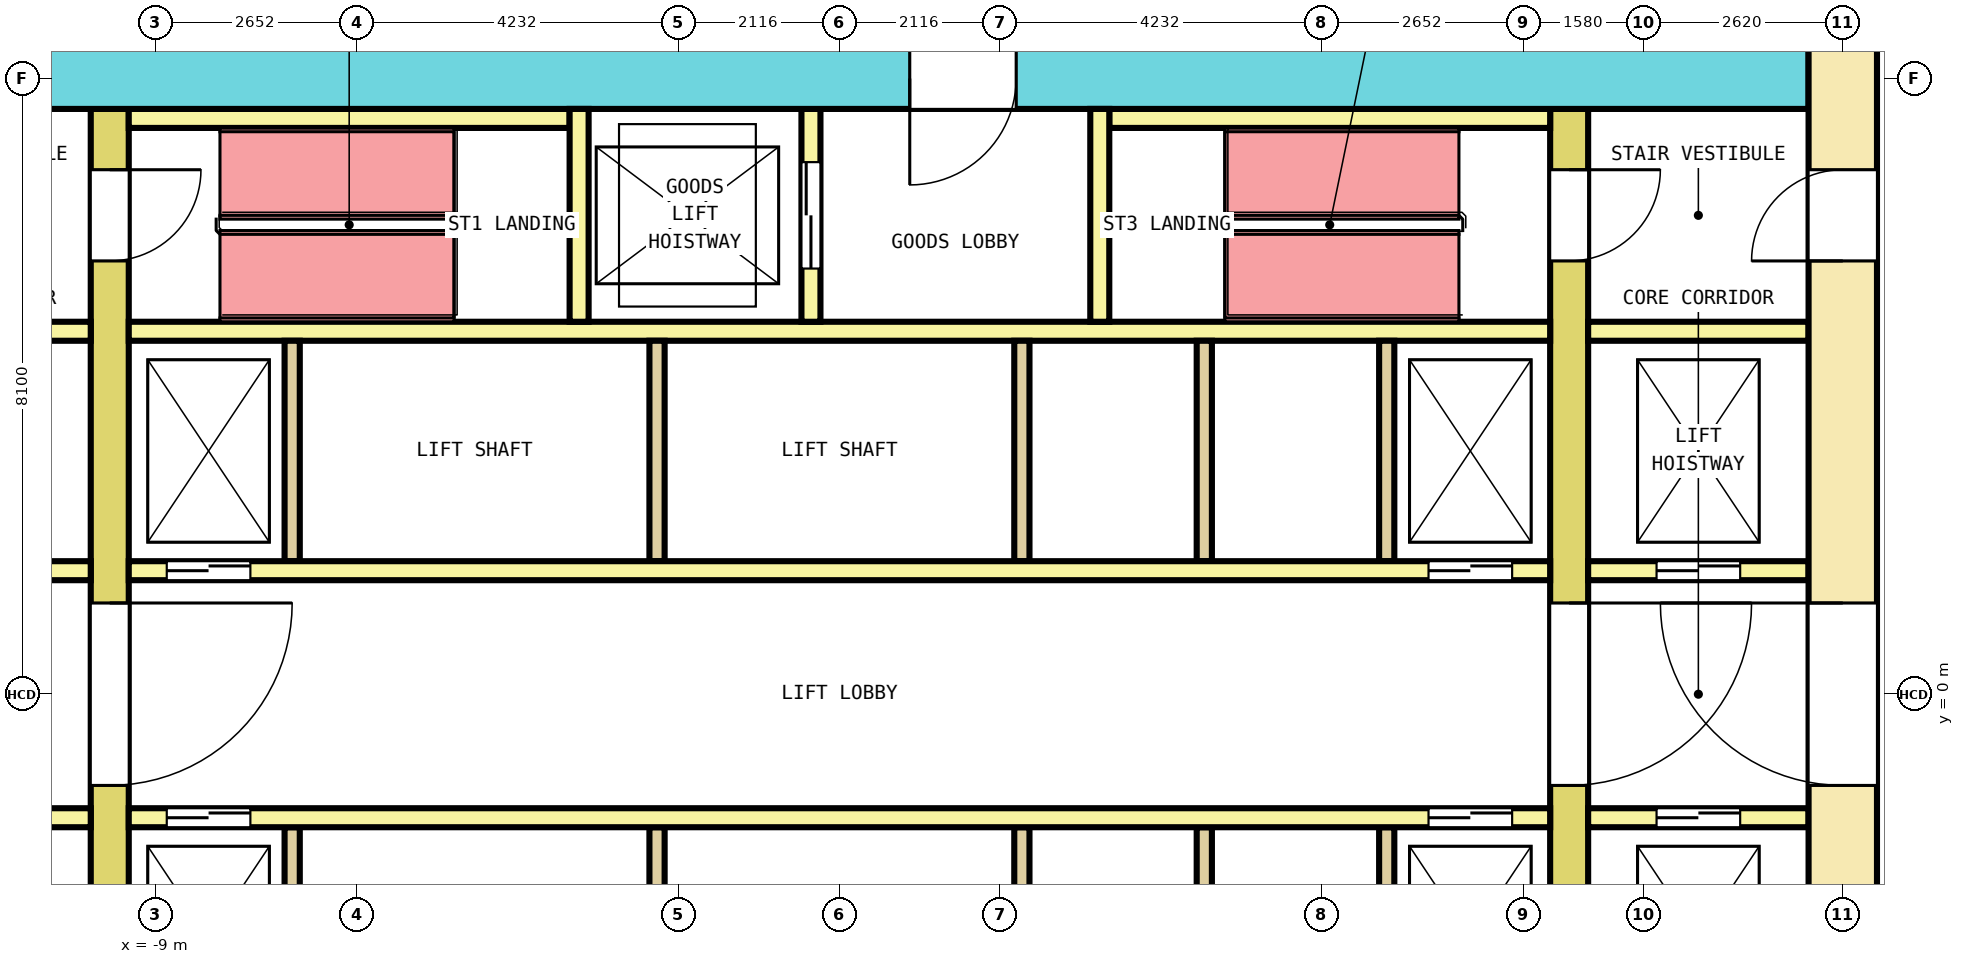
"""IFC4 building model, lengths in metres.
Left out: names, types, materials, properties, quantities, classifications, styles, units other than length and angle.
Written with IfcOpenShell. Run it as: python <this file> out.ifc"""

import sys

from ifc_helpers import new_model, si_unit, direction, frame, frame_2d, origin, place, context, subcontext, project, spatial, rectangle, extrude, element, fill, save


model = new_model("IFC4")
c1 = context("Model", 3, precision=1e-05, world=origin(), true_north=direction((0.0, 1.0)))
c2 = subcontext(c1, "Body", "Model", "MODEL_VIEW")
j1 = project(units=[si_unit("LENGTHUNIT", "METRE"), si_unit("PLANEANGLEUNIT", "RADIAN")], contexts=[c1])
p1 = place(None, origin())
s1 = spatial("IfcSite", under=j1, at=p1, CompositionType="ELEMENT")
p2 = place(p1, origin())
s2 = spatial("IfcBuilding", under=s1, at=p2, CompositionType="ELEMENT")
p3 = place(p2, frame((0.0, 0.0, 45.4)))
s3 = spatial("IfcBuildingStorey", under=s2, at=p3, CompositionType="ELEMENT", Elevation=45.4)
p4 = place(p3, frame((13.2, -10.35, 0.0), z_axis=(0.0, 0.0, 1.0), x_axis=(0.0, 1.0, 0.0)))
e1 = element("IfcWall", 1, at=p4, inside=s3, PredefinedType="SHEAR", context=c2, shape_type="SweptSolid", body=[
    extrude(rectangle(XDim=20.7, YDim=0.9, at=frame_2d((10.35, 0.0))), origin(), (0.0, 0.0, 1.0), 4.1),
])
p5 = place(p4, frame((9.15, 0.0, 0.0)))
e2 = element("IfcOpeningElement", 2, at=p5, cuts=e1, PredefinedType="OPENING", context=c2, shape_type="SweptSolid", body=[
    extrude(rectangle(XDim=2.4, YDim=2.1, at=frame_2d((1.2, 1.05))), frame((0.0, 0.46, 0.0), z_axis=(0.0, -1.0, 0.0), x_axis=(1.0, 0.0, 0.0)), (0.0, 0.0, 1.0), 0.92),
])
p6 = place(p4, frame((16.05, 0.0, 0.0)))
e3 = element("IfcOpeningElement", 3, at=p6, cuts=e1, PredefinedType="OPENING", context=c2, shape_type="SweptSolid", body=[
    extrude(rectangle(XDim=1.2, YDim=2.1, at=frame_2d((0.6, 1.05))), frame((0.0, 0.46, 0.0), z_axis=(0.0, -1.0, 0.0), x_axis=(1.0, 0.0, 0.0)), (0.0, 0.0, 1.0), 0.92),
])
p7 = place(p4, frame((3.55, 0.0, 0.0)))
e4 = element("IfcOpeningElement", 4, at=p7, cuts=e1, PredefinedType="OPENING", context=c2, shape_type="SweptSolid", body=[
    extrude(rectangle(XDim=1.0, YDim=2.1, at=frame_2d((0.5, 1.05))), frame((0.0, 0.46, 0.0), z_axis=(0.0, -1.0, 0.0), x_axis=(1.0, 0.0, 0.0)), (0.0, 0.0, 1.0), 0.92),
])
p8 = place(p3, frame((-12.75, 8.1, 0.0), z_axis=(0.0, 0.0, 1.0), x_axis=(1.0, 0.0, 0.0)))
e5 = element("IfcWall", 5, at=p8, inside=s3, PredefinedType="SHEAR", context=c2, shape_type="SweptSolid", body=[
    extrude(rectangle(XDim=25.5, YDim=0.8, at=frame_2d((12.75, 0.0))), origin(), (0.0, 0.0, 1.0), 4.1),
])
p9 = place(p8, frame((13.675, 0.0, 0.0)))
e6 = element("IfcOpeningElement", 6, at=p9, cuts=e5, PredefinedType="OPENING", context=c2, shape_type="SweptSolid", body=[
    extrude(rectangle(XDim=1.4, YDim=2.1, at=frame_2d((0.7, 1.05))), frame((0.0, 0.41, 0.0), z_axis=(0.0, -1.0, 0.0), x_axis=(1.0, 0.0, 0.0)), (0.0, 0.0, 1.0), 0.82),
])
p10 = place(p3, frame((-9.6, -7.7, 0.0), z_axis=(0.0, 0.0, 1.0), x_axis=(0.0, 1.0, 0.0)))
e7 = element("IfcWall", 7, at=p10, inside=s3, PredefinedType="SHEAR", context=c2, shape_type="SweptSolid", body=[
    extrude(rectangle(XDim=15.4, YDim=0.5, at=frame_2d((7.7, 0.0))), origin(), (0.0, 0.0, 1.0), 4.1),
])
p11 = place(p10, frame((6.5, 0.0, 0.0)))
e8 = element("IfcOpeningElement", 8, at=p11, cuts=e7, PredefinedType="OPENING", context=c2, shape_type="SweptSolid", body=[
    extrude(rectangle(XDim=2.4, YDim=2.1, at=frame_2d((1.2, 1.05))), frame((0.0, 0.26, 0.0), z_axis=(0.0, -1.0, 0.0), x_axis=(1.0, 0.0, 0.0)), (0.0, 0.0, 1.0), 0.52),
])
p12 = place(p10, frame((13.4, 0.0, 0.0)))
e9 = element("IfcOpeningElement", 9, at=p12, cuts=e7, PredefinedType="OPENING", context=c2, shape_type="SweptSolid", body=[
    extrude(rectangle(XDim=1.2, YDim=2.1, at=frame_2d((0.6, 1.05))), frame((0.0, 0.26, 0.0), z_axis=(0.0, -1.0, 0.0), x_axis=(1.0, 0.0, 0.0)), (0.0, 0.0, 1.0), 0.52),
])
p13 = place(p10, frame((0.8, 0.0, 0.0)))
e10 = element("IfcOpeningElement", 10, at=p13, cuts=e7, PredefinedType="OPENING", context=c2, shape_type="SweptSolid", body=[
    extrude(rectangle(XDim=1.2, YDim=2.1, at=frame_2d((0.6, 1.05))), frame((0.0, 0.26, 0.0), z_axis=(0.0, -1.0, 0.0), x_axis=(1.0, 0.0, 0.0)), (0.0, 0.0, 1.0), 0.52),
])
p14 = place(p3, frame((9.6, -7.7, 0.0), z_axis=(0.0, 0.0, 1.0), x_axis=(0.0, 1.0, 0.0)))
e11 = element("IfcWall", 11, at=p14, inside=s3, PredefinedType="SHEAR", context=c2, shape_type="SweptSolid", body=[
    extrude(rectangle(XDim=15.4, YDim=0.5, at=frame_2d((7.7, 0.0))), origin(), (0.0, 0.0, 1.0), 4.1),
])
p15 = place(p14, frame((6.5, 0.0, 0.0)))
e12 = element("IfcOpeningElement", 12, at=p15, cuts=e11, PredefinedType="OPENING", context=c2, shape_type="SweptSolid", body=[
    extrude(rectangle(XDim=2.4, YDim=2.1, at=frame_2d((1.2, 1.05))), frame((0.0, 0.26, 0.0), z_axis=(0.0, -1.0, 0.0), x_axis=(1.0, 0.0, 0.0)), (0.0, 0.0, 1.0), 0.52),
])
p16 = place(p14, frame((13.4, 0.0, 0.0)))
e13 = element("IfcOpeningElement", 13, at=p16, cuts=e11, PredefinedType="OPENING", context=c2, shape_type="SweptSolid", body=[
    extrude(rectangle(XDim=1.2, YDim=2.1, at=frame_2d((0.6, 1.05))), frame((0.0, 0.26, 0.0), z_axis=(0.0, -1.0, 0.0), x_axis=(1.0, 0.0, 0.0)), (0.0, 0.0, 1.0), 0.52),
])
p17 = place(p14, frame((0.9, 0.0, 0.0)))
e14 = element("IfcOpeningElement", 14, at=p17, cuts=e11, PredefinedType="OPENING", context=c2, shape_type="SweptSolid", body=[
    extrude(rectangle(XDim=1.0, YDim=2.1, at=frame_2d((0.5, 1.05))), frame((0.0, 0.26, 0.0), z_axis=(0.0, -1.0, 0.0), x_axis=(1.0, 0.0, 0.0)), (0.0, 0.0, 1.0), 0.52),
])
p18 = place(p3, frame((-12.75, 1.625, 0.0), z_axis=(0.0, 0.0, 1.0), x_axis=(1.0, 0.0, 0.0)))
e15 = element("IfcWall", 15, at=p18, inside=s3, PredefinedType="SOLIDWALL", context=c2, shape_type="SweptSolid", body=[
    extrude(rectangle(XDim=2.9, YDim=0.25, at=frame_2d((1.45, 0.0))), origin(), (0.0, 0.0, 1.0), 4.1),
])
p19 = place(p18, frame((0.9, 0.0, 0.0)))
e16 = element("IfcOpeningElement", 16, at=p19, cuts=e15, PredefinedType="OPENING", context=c2, shape_type="SweptSolid", body=[
    extrude(rectangle(XDim=1.1, YDim=2.1, at=frame_2d((0.55, 1.05))), frame((0.0, 0.135, 0.0), z_axis=(0.0, -1.0, 0.0), x_axis=(1.0, 0.0, 0.0)), (0.0, 0.0, 1.0), 0.27),
])
p20 = place(p3, frame((-9.35, 1.625, 0.0), z_axis=(0.0, 0.0, 1.0), x_axis=(1.0, 0.0, 0.0)))
e17 = element("IfcWall", 17, at=p20, inside=s3, PredefinedType="SOLIDWALL", context=c2, shape_type="SweptSolid", body=[
    extrude(rectangle(XDim=18.7, YDim=0.25, at=frame_2d((9.35, 0.0))), origin(), (0.0, 0.0, 1.0), 4.1),
])
p21 = place(p20, frame((0.5, 0.0, 0.0)))
e18 = element("IfcOpeningElement", 18, at=p21, cuts=e17, PredefinedType="OPENING", context=c2, shape_type="SweptSolid", body=[
    extrude(rectangle(XDim=1.1, YDim=2.1, at=frame_2d((0.55, 1.05))), frame((0.0, 0.135, 0.0), z_axis=(0.0, -1.0, 0.0), x_axis=(1.0, 0.0, 0.0)), (0.0, 0.0, 1.0), 0.27),
])
p22 = place(p20, frame((17.1, 0.0, 0.0)))
e19 = element("IfcOpeningElement", 19, at=p22, cuts=e17, PredefinedType="OPENING", context=c2, shape_type="SweptSolid", body=[
    extrude(rectangle(XDim=1.1, YDim=2.1, at=frame_2d((0.55, 1.05))), frame((0.0, 0.135, 0.0), z_axis=(0.0, -1.0, 0.0), x_axis=(1.0, 0.0, 0.0)), (0.0, 0.0, 1.0), 0.27),
])
p23 = place(p3, frame((9.85, 1.625, 0.0), z_axis=(0.0, 0.0, 1.0), x_axis=(1.0, 0.0, 0.0)))
e20 = element("IfcWall", 20, at=p23, inside=s3, PredefinedType="SOLIDWALL", context=c2, shape_type="SweptSolid", body=[
    extrude(rectangle(XDim=2.9, YDim=0.25, at=frame_2d((1.45, 0.0))), origin(), (0.0, 0.0, 1.0), 4.1),
])
p24 = place(p23, frame((0.9, 0.0, 0.0)))
e21 = element("IfcOpeningElement", 21, at=p24, cuts=e20, PredefinedType="OPENING", context=c2, shape_type="SweptSolid", body=[
    extrude(rectangle(XDim=1.1, YDim=2.1, at=frame_2d((0.55, 1.05))), frame((0.0, 0.135, 0.0), z_axis=(0.0, -1.0, 0.0), x_axis=(1.0, 0.0, 0.0)), (0.0, 0.0, 1.0), 0.27),
])
p25 = place(p3, frame((-12.75, 4.775, 0.0), z_axis=(0.0, 0.0, 1.0), x_axis=(1.0, 0.0, 0.0)))
e22 = element("IfcWall", 22, at=p25, inside=s3, PredefinedType="SOLIDWALL", context=c2, shape_type="SweptSolid", body=[
    extrude(rectangle(XDim=2.9, YDim=0.25, at=frame_2d((1.45, 0.0))), origin(), (0.0, 0.0, 1.0), 4.1),
])
p26 = place(p3, frame((-9.35, 4.775, 0.0), z_axis=(0.0, 0.0, 1.0), x_axis=(1.0, 0.0, 0.0)))
e23 = element("IfcWall", 23, at=p26, inside=s3, PredefinedType="SOLIDWALL", context=c2, shape_type="SweptSolid", body=[
    extrude(rectangle(XDim=18.7, YDim=0.25, at=frame_2d((9.35, 0.0))), origin(), (0.0, 0.0, 1.0), 4.1),
])
p27 = place(p3, frame((9.85, 4.775, 0.0), z_axis=(0.0, 0.0, 1.0), x_axis=(1.0, 0.0, 0.0)))
e24 = element("IfcWall", 24, at=p27, inside=s3, PredefinedType="SOLIDWALL", context=c2, shape_type="SweptSolid", body=[
    extrude(rectangle(XDim=2.9, YDim=0.25, at=frame_2d((1.45, 0.0))), origin(), (0.0, 0.0, 1.0), 4.1),
])
for number, where, z_axis, x_axis in (
    (25, (-7.2, 1.75, 0.0), (0.0, 0.0, 1.0), (0.0, 1.0, 0.0)),
    (26, (-2.4, 1.75, 0.0), (0.0, 0.0, 1.0), (0.0, 1.0, 0.0)),
    (27, (2.4, 1.75, 0.0), (0.0, 0.0, 1.0), (0.0, 1.0, 0.0)),
    (28, (4.8, 1.75, 0.0), (0.0, 0.0, 1.0), (0.0, 1.0, 0.0)),
    (29, (7.2, 1.75, 0.0), (0.0, 0.0, 1.0), (0.0, 1.0, 0.0)),
):
    element("IfcWall", number, at=place(p3, frame(where, z_axis=z_axis, x_axis=x_axis)), inside=s3, PredefinedType="SOLIDWALL", context=c2, shape_type="SweptSolid", body=[
        extrude(rectangle(XDim=2.9, YDim=0.2, at=frame_2d((1.45, 0.0))), origin(), (0.0, 0.0, 1.0), 4.1),
    ])
p28 = place(p3, frame((-12.75, -1.625, 0.0), z_axis=(0.0, 0.0, 1.0), x_axis=(1.0, 0.0, 0.0)))
e30 = element("IfcWall", 30, at=p28, inside=s3, PredefinedType="SOLIDWALL", context=c2, shape_type="SweptSolid", body=[
    extrude(rectangle(XDim=2.9, YDim=0.25, at=frame_2d((1.45, 0.0))), origin(), (0.0, 0.0, 1.0), 4.1),
])
p29 = place(p28, frame((0.9, 0.0, 0.0)))
e31 = element("IfcOpeningElement", 31, at=p29, cuts=e30, PredefinedType="OPENING", context=c2, shape_type="SweptSolid", body=[
    extrude(rectangle(XDim=1.1, YDim=2.1, at=frame_2d((0.55, 1.05))), frame((0.0, 0.135, 0.0), z_axis=(0.0, -1.0, 0.0), x_axis=(1.0, 0.0, 0.0)), (0.0, 0.0, 1.0), 0.27),
])
p30 = place(p3, frame((-9.35, -1.625, 0.0), z_axis=(0.0, 0.0, 1.0), x_axis=(1.0, 0.0, 0.0)))
e32 = element("IfcWall", 32, at=p30, inside=s3, PredefinedType="SOLIDWALL", context=c2, shape_type="SweptSolid", body=[
    extrude(rectangle(XDim=18.7, YDim=0.25, at=frame_2d((9.35, 0.0))), origin(), (0.0, 0.0, 1.0), 4.1),
])
p31 = place(p30, frame((0.5, 0.0, 0.0)))
e33 = element("IfcOpeningElement", 33, at=p31, cuts=e32, PredefinedType="OPENING", context=c2, shape_type="SweptSolid", body=[
    extrude(rectangle(XDim=1.1, YDim=2.1, at=frame_2d((0.55, 1.05))), frame((0.0, 0.135, 0.0), z_axis=(0.0, -1.0, 0.0), x_axis=(1.0, 0.0, 0.0)), (0.0, 0.0, 1.0), 0.27),
])
p32 = place(p30, frame((17.1, 0.0, 0.0)))
e34 = element("IfcOpeningElement", 34, at=p32, cuts=e32, PredefinedType="OPENING", context=c2, shape_type="SweptSolid", body=[
    extrude(rectangle(XDim=1.1, YDim=2.1, at=frame_2d((0.55, 1.05))), frame((0.0, 0.135, 0.0), z_axis=(0.0, -1.0, 0.0), x_axis=(1.0, 0.0, 0.0)), (0.0, 0.0, 1.0), 0.27),
])
p33 = place(p3, frame((9.85, -1.625, 0.0), z_axis=(0.0, 0.0, 1.0), x_axis=(1.0, 0.0, 0.0)))
e35 = element("IfcWall", 35, at=p33, inside=s3, PredefinedType="SOLIDWALL", context=c2, shape_type="SweptSolid", body=[
    extrude(rectangle(XDim=2.9, YDim=0.25, at=frame_2d((1.45, 0.0))), origin(), (0.0, 0.0, 1.0), 4.1),
])
p34 = place(p33, frame((0.9, 0.0, 0.0)))
e36 = element("IfcOpeningElement", 36, at=p34, cuts=e35, PredefinedType="OPENING", context=c2, shape_type="SweptSolid", body=[
    extrude(rectangle(XDim=1.1, YDim=2.1, at=frame_2d((0.55, 1.05))), frame((0.0, 0.135, 0.0), z_axis=(0.0, -1.0, 0.0), x_axis=(1.0, 0.0, 0.0)), (0.0, 0.0, 1.0), 0.27),
])
for number, where, z_axis, x_axis in (
    (37, (-7.2, -4.65, 0.0), (0.0, 0.0, 1.0), (0.0, 1.0, 0.0)),
    (38, (-2.4, -4.65, 0.0), (0.0, 0.0, 1.0), (0.0, 1.0, 0.0)),
    (39, (2.4, -4.65, 0.0), (0.0, 0.0, 1.0), (0.0, 1.0, 0.0)),
    (40, (4.8, -4.65, 0.0), (0.0, 0.0, 1.0), (0.0, 1.0, 0.0)),
    (41, (7.2, -4.65, 0.0), (0.0, 0.0, 1.0), (0.0, 1.0, 0.0)),
):
    element("IfcWall", number, at=place(p3, frame(where, z_axis=z_axis, x_axis=x_axis)), inside=s3, PredefinedType="SOLIDWALL", context=c2, shape_type="SweptSolid", body=[
        extrude(rectangle(XDim=2.9, YDim=0.2, at=frame_2d((1.45, 0.0))), origin(), (0.0, 0.0, 1.0), 4.1),
    ])
for number, where, z_axis, x_axis in (
    (42, (-9.35, 7.575, 0.0), (0.0, 0.0, 1.0), (1.0, 0.0, 0.0)),
    (43, (3.55, 7.575, 0.0), (0.0, 0.0, 1.0), (1.0, 0.0, 0.0)),
):
    element("IfcWall", number, at=place(p3, frame(where, z_axis=z_axis, x_axis=x_axis)), inside=s3, PredefinedType="SOLIDWALL", context=c2, shape_type="SweptSolid", body=[
        extrude(rectangle(XDim=5.8, YDim=0.25, at=frame_2d((2.9, 0.0))), origin(), (0.0, 0.0, 1.0), 4.1),
    ])
p35 = place(p3, frame((-3.425, 4.9, 0.0), z_axis=(0.0, 0.0, 1.0), x_axis=(0.0, 1.0, 0.0)))
e44 = element("IfcWall", 44, at=p35, inside=s3, PredefinedType="SOLIDWALL", context=c2, shape_type="SweptSolid", body=[
    extrude(rectangle(XDim=2.8, YDim=0.25, at=frame_2d((1.4, 0.0))), origin(), (0.0, 0.0, 1.0), 4.1),
])
p36 = place(p3, frame((-0.375, 4.9, 0.0), z_axis=(0.0, 0.0, 1.0), x_axis=(0.0, 1.0, 0.0)))
e45 = element("IfcWall", 45, at=p36, inside=s3, PredefinedType="SOLIDWALL", context=c2, shape_type="SweptSolid", body=[
    extrude(rectangle(XDim=2.8, YDim=0.25, at=frame_2d((1.4, 0.0))), origin(), (0.0, 0.0, 1.0), 4.1),
])
p37 = place(p36, frame((0.7, 0.0, 0.0)))
e46 = element("IfcOpeningElement", 46, at=p37, cuts=e45, PredefinedType="OPENING", context=c2, shape_type="SweptSolid", body=[
    extrude(rectangle(XDim=1.4, YDim=2.1, at=frame_2d((0.7, 1.05))), frame((0.0, 0.135, 0.0), z_axis=(0.0, -1.0, 0.0), x_axis=(1.0, 0.0, 0.0)), (0.0, 0.0, 1.0), 0.27),
])
p38 = place(p3, frame((3.425, 4.9, 0.0), z_axis=(0.0, 0.0, 1.0), x_axis=(0.0, 1.0, 0.0)))
e47 = element("IfcWall", 47, at=p38, inside=s3, PredefinedType="SOLIDWALL", context=c2, shape_type="SweptSolid", body=[
    extrude(rectangle(XDim=2.8, YDim=0.25, at=frame_2d((1.4, 0.0))), origin(), (0.0, 0.0, 1.0), 4.1),
])
p39 = place(p21, origin())
e48 = element("IfcDoor", 48, at=p39, inside=s3, OperationType="DOUBLE_DOOR_SLIDING", PredefinedType="DOOR", context=c2, shape_type="SweptSolid", body=[
    extrude(rectangle(XDim=1.1, YDim=2.1, at=frame_2d((0.55, 1.05))), frame((0.0, 0.075, 0.0), z_axis=(0.0, -1.0, 0.0), x_axis=(1.0, 0.0, 0.0)), (0.0, 0.0, 1.0), 0.15),
])
fill(e18, e48)
p40 = place(p22, origin())
e49 = element("IfcDoor", 49, at=p40, inside=s3, OperationType="DOUBLE_DOOR_SLIDING", PredefinedType="DOOR", context=c2, shape_type="SweptSolid", body=[
    extrude(rectangle(XDim=1.1, YDim=2.1, at=frame_2d((0.55, 1.05))), frame((0.0, 0.075, 0.0), z_axis=(0.0, -1.0, 0.0), x_axis=(1.0, 0.0, 0.0)), (0.0, 0.0, 1.0), 0.15),
])
fill(e19, e49)
p41 = place(p24, origin())
e50 = element("IfcDoor", 50, at=p41, inside=s3, OperationType="DOUBLE_DOOR_SLIDING", PredefinedType="DOOR", context=c2, shape_type="SweptSolid", body=[
    extrude(rectangle(XDim=1.1, YDim=2.1, at=frame_2d((0.55, 1.05))), frame((0.0, 0.075, 0.0), z_axis=(0.0, -1.0, 0.0), x_axis=(1.0, 0.0, 0.0)), (0.0, 0.0, 1.0), 0.15),
])
fill(e21, e50)
p42 = place(p31, origin())
e51 = element("IfcDoor", 51, at=p42, inside=s3, OperationType="DOUBLE_DOOR_SLIDING", PredefinedType="DOOR", context=c2, shape_type="SweptSolid", body=[
    extrude(rectangle(XDim=1.1, YDim=2.1, at=frame_2d((0.55, 1.05))), frame((0.0, 0.075, 0.0), z_axis=(0.0, -1.0, 0.0), x_axis=(1.0, 0.0, 0.0)), (0.0, 0.0, 1.0), 0.15),
])
fill(e33, e51)
p43 = place(p32, origin())
e52 = element("IfcDoor", 52, at=p43, inside=s3, OperationType="DOUBLE_DOOR_SLIDING", PredefinedType="DOOR", context=c2, shape_type="SweptSolid", body=[
    extrude(rectangle(XDim=1.1, YDim=2.1, at=frame_2d((0.55, 1.05))), frame((0.0, 0.075, 0.0), z_axis=(0.0, -1.0, 0.0), x_axis=(1.0, 0.0, 0.0)), (0.0, 0.0, 1.0), 0.15),
])
fill(e34, e52)
p44 = place(p34, origin())
e53 = element("IfcDoor", 53, at=p44, inside=s3, OperationType="DOUBLE_DOOR_SLIDING", PredefinedType="DOOR", context=c2, shape_type="SweptSolid", body=[
    extrude(rectangle(XDim=1.1, YDim=2.1, at=frame_2d((0.55, 1.05))), frame((0.0, 0.075, 0.0), z_axis=(0.0, -1.0, 0.0), x_axis=(1.0, 0.0, 0.0)), (0.0, 0.0, 1.0), 0.15),
])
fill(e36, e53)
p45 = place(p37, origin())
e54 = element("IfcDoor", 54, at=p45, inside=s3, OperationType="DOUBLE_DOOR_SLIDING", PredefinedType="DOOR", context=c2, shape_type="SweptSolid", body=[
    extrude(rectangle(XDim=1.4, YDim=2.1, at=frame_2d((0.7, 1.05))), frame((0.0, 0.075, 0.0), z_axis=(0.0, -1.0, 0.0), x_axis=(1.0, 0.0, 0.0)), (0.0, 0.0, 1.0), 0.15),
])
fill(e46, e54)
p46 = place(p11, origin())
e55 = element("IfcDoor", 55, at=p46, inside=s3, OperationType="DOUBLE_DOOR_SINGLE_SWING", PredefinedType="DOOR", context=c2, shape_type="SweptSolid", body=[
    extrude(rectangle(XDim=2.4, YDim=2.1, at=frame_2d((1.2, 1.05))), frame((0.0, 0.2, 0.0), z_axis=(0.0, -1.0, 0.0), x_axis=(1.0, 0.0, 0.0)), (0.0, 0.0, 1.0), 0.4),
])
fill(e8, e55)
p47 = place(p15, origin())
e56 = element("IfcDoor", 56, at=p47, inside=s3, OperationType="DOUBLE_DOOR_SINGLE_SWING", PredefinedType="DOOR", context=c2, shape_type="SweptSolid", body=[
    extrude(rectangle(XDim=2.4, YDim=2.1, at=frame_2d((1.2, 1.05))), frame((0.0, 0.2, 0.0), z_axis=(0.0, -1.0, 0.0), x_axis=(1.0, 0.0, 0.0)), (0.0, 0.0, 1.0), 0.4),
])
fill(e12, e56)
p48 = place(p5, origin())
e57 = element("IfcDoor", 57, at=p48, inside=s3, OperationType="DOUBLE_DOOR_SINGLE_SWING", PredefinedType="DOOR", context=c2, shape_type="SweptSolid", body=[
    extrude(rectangle(XDim=2.4, YDim=2.1, at=frame_2d((1.2, 1.05))), frame((0.0, 0.3, 0.0), z_axis=(0.0, -1.0, 0.0), x_axis=(1.0, 0.0, 0.0)), (0.0, 0.0, 1.0), 0.6),
])
fill(e2, e57)
p49 = place(p12, origin())
e58 = element("IfcDoor", 58, at=p49, inside=s3, OperationType="SINGLE_SWING_LEFT", PredefinedType="DOOR", context=c2, shape_type="SweptSolid", body=[
    extrude(rectangle(XDim=1.2, YDim=2.1, at=frame_2d((0.6, 1.05))), frame((0.0, 0.2, 0.0), z_axis=(0.0, -1.0, 0.0), x_axis=(1.0, 0.0, 0.0)), (0.0, 0.0, 1.0), 0.4),
])
fill(e9, e58)
p50 = place(p16, origin())
e59 = element("IfcDoor", 59, at=p50, inside=s3, OperationType="SINGLE_SWING_LEFT", PredefinedType="DOOR", context=c2, shape_type="SweptSolid", body=[
    extrude(rectangle(XDim=1.2, YDim=2.1, at=frame_2d((0.6, 1.05))), frame((0.0, 0.2, 0.0), z_axis=(0.0, -1.0, 0.0), x_axis=(1.0, 0.0, 0.0)), (0.0, 0.0, 1.0), 0.4),
])
fill(e13, e59)
p51 = place(p6, origin())
e60 = element("IfcDoor", 60, at=p51, inside=s3, OperationType="SINGLE_SWING_RIGHT", PredefinedType="DOOR", context=c2, shape_type="SweptSolid", body=[
    extrude(rectangle(XDim=1.2, YDim=2.1, at=frame_2d((0.6, 1.05))), frame((0.0, 0.3, 0.0), z_axis=(0.0, -1.0, 0.0), x_axis=(1.0, 0.0, 0.0)), (0.0, 0.0, 1.0), 0.6),
])
fill(e3, e60)
p52 = place(p9, origin())
e61 = element("IfcDoor", 61, at=p52, inside=s3, OperationType="DOUBLE_DOOR_SINGLE_SWING", PredefinedType="DOOR", context=c2, shape_type="SweptSolid", body=[
    extrude(rectangle(XDim=1.4, YDim=2.1, at=frame_2d((0.7, 1.05))), frame((0.0, 0.3, 0.0), z_axis=(0.0, -1.0, 0.0), x_axis=(1.0, 0.0, 0.0)), (0.0, 0.0, 1.0), 0.6),
])
fill(e6, e61)
save(model, sys.argv[1])
